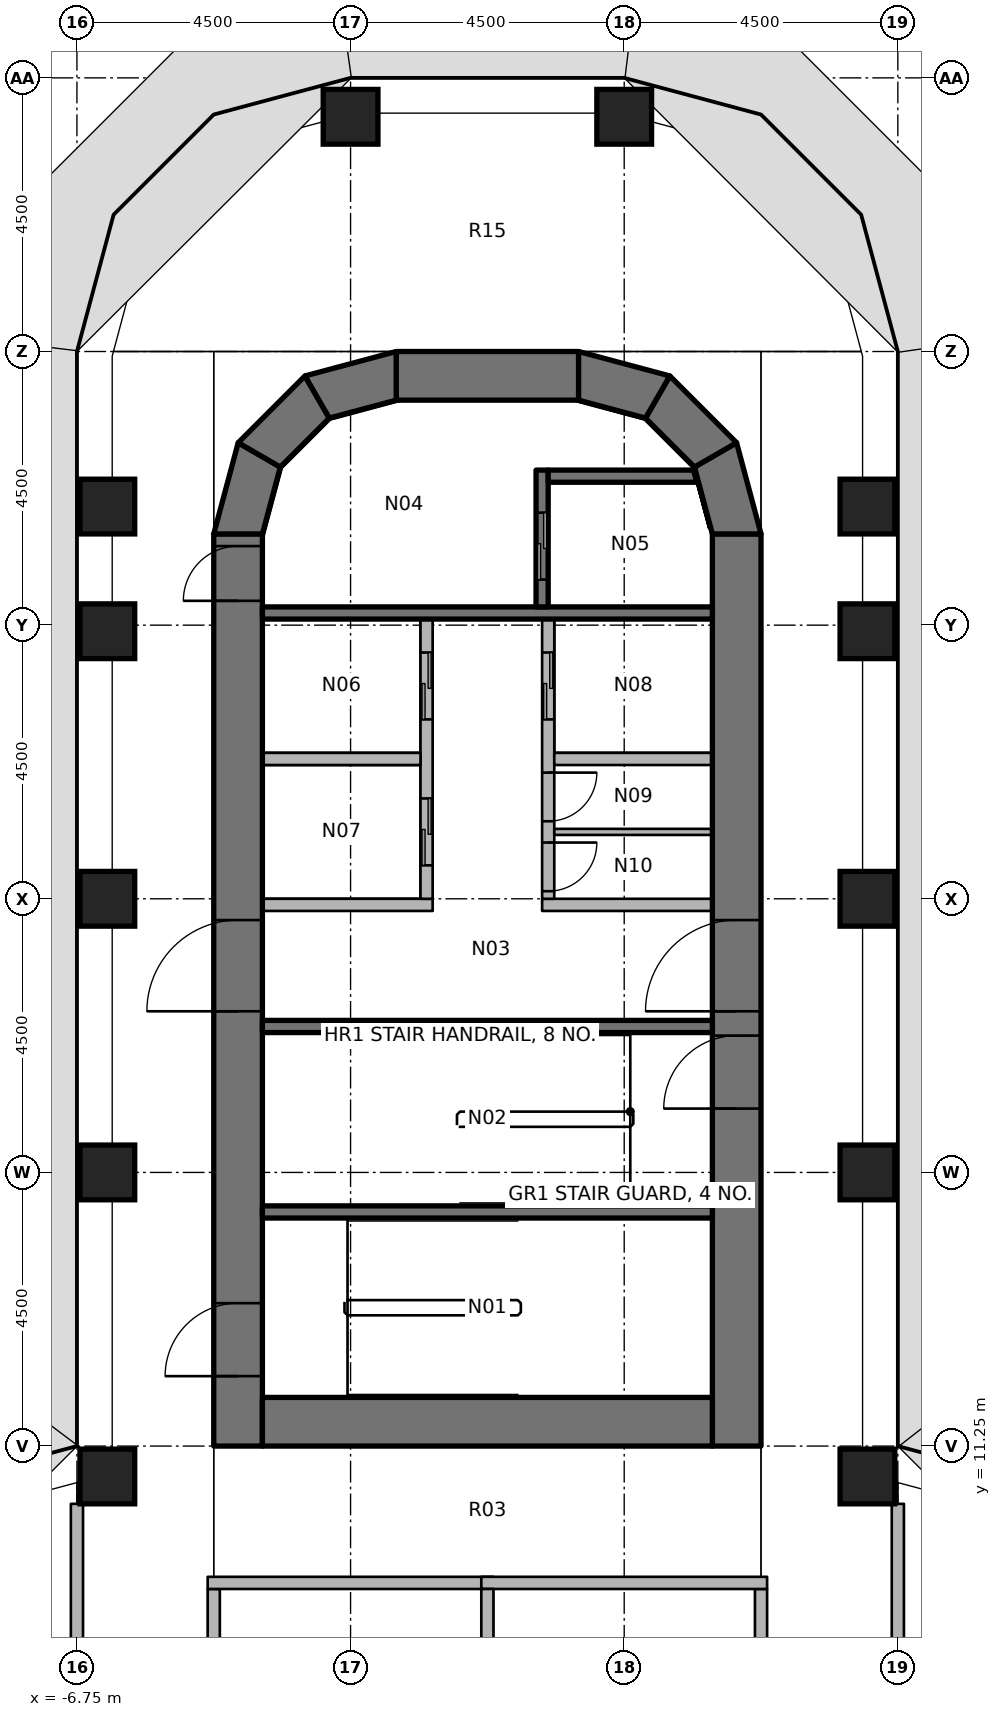
"""IFC4 building model, lengths in metres.
Left out: names, types, materials, properties, quantities, classifications, styles, units other than length and angle.
Written with IfcOpenShell. Run it as: python <this file> out.ifc"""

import sys

from ifc_helpers import new_model, si_unit, direction, frame, frame_2d, origin, origin_2d, place, context, subcontext, project, spatial, polyline, rectangle, outline, extrude, element, fill, save


model = new_model("IFC4")
c1 = context("Model", 3, precision=1e-05, world=origin(), true_north=direction((0.0, 1.0)))
c2 = subcontext(c1, "Body", "Model", "MODEL_VIEW")
j1 = project(units=[si_unit("LENGTHUNIT", "METRE"), si_unit("PLANEANGLEUNIT", "RADIAN")], contexts=[c1])
p1 = place(None, origin())
s1 = spatial("IfcSite", under=j1, at=p1, CompositionType="ELEMENT")
p2 = place(p1, origin())
s2 = spatial("IfcBuilding", under=s1, at=p2, CompositionType="ELEMENT")
p3 = place(p2, frame((0.0, 0.0, 86.6)))
s3 = spatial("IfcBuildingStorey", under=s2, at=p3, CompositionType="ELEMENT", Elevation=86.6)
for number, where, z_axis, x_axis in (
    (1, (-6.25, 10.75, 0.0), (0.0, 0.0, 1.0), (1.0, 0.0, 0.0)),
    (2, (-6.25, 15.75, 0.0), (0.0, 0.0, 1.0), (1.0, 0.0, 0.0)),
    (3, (-6.25, 20.25, 0.0), (0.0, 0.0, 1.0), (1.0, 0.0, 0.0)),
    (4, (-6.25, 24.65, 0.0), (0.0, 0.0, 1.0), (1.0, 0.0, 0.0)),
    (5, (-6.25, 26.7, 0.0), (0.0, 0.0, 1.0), (1.0, 0.0, 0.0)),
    (6, (-2.25, 33.11, 0.0), (0.0, 0.0, 1.0), (1.0, 0.0, 0.0)),
    (7, (2.25, 33.11, 0.0), (0.0, 0.0, 1.0), (1.0, 0.0, 0.0)),
    (8, (6.25, 10.75, 0.0), (0.0, 0.0, 1.0), (1.0, 0.0, 0.0)),
    (9, (6.25, 15.75, 0.0), (0.0, 0.0, 1.0), (1.0, 0.0, 0.0)),
    (10, (6.25, 20.25, 0.0), (0.0, 0.0, 1.0), (1.0, 0.0, 0.0)),
    (11, (6.25, 24.65, 0.0), (0.0, 0.0, 1.0), (1.0, 0.0, 0.0)),
    (12, (6.25, 26.7, 0.0), (0.0, 0.0, 1.0), (1.0, 0.0, 0.0)),
):
    element("IfcColumn", number, at=place(p3, frame(where, z_axis=z_axis, x_axis=x_axis)), inside=s3, PredefinedType="COLUMN", context=c2, shape_type="SweptSolid", body=[
        extrude(rectangle(XDim=0.9, YDim=0.9, at=origin_2d()), origin(), (0.0, 0.0, 1.0), 3.65),
    ])
p4 = place(p3, frame((-4.1, 11.25, 0.0), z_axis=(0.0, 0.0, 1.0), x_axis=(0.0, 1.0, 0.0)))
e13 = element("IfcWall", 13, at=p4, inside=s3, PredefinedType="SHEAR", context=c2, shape_type="SweptSolid", body=[
    extrude(rectangle(XDim=15.0, YDim=0.8, at=frame_2d((7.5, 0.0))), origin(), (0.0, 0.0, 1.0), 3.8),
])
p5 = place(p4, frame((7.15, 0.0, 0.0)))
e14 = element("IfcOpeningElement", 14, at=p5, cuts=e13, PredefinedType="OPENING", context=c2, shape_type="SweptSolid", body=[
    extrude(rectangle(XDim=1.5, YDim=2.3, at=frame_2d((0.75, 1.15))), frame((0.0, 0.41, 0.0), z_axis=(0.0, -1.0, 0.0), x_axis=(1.0, 0.0, 0.0)), (0.0, 0.0, 1.0), 0.82),
])
p6 = place(p4, frame((13.9, 0.0, 0.0)))
e15 = element("IfcOpeningElement", 15, at=p6, cuts=e13, PredefinedType="OPENING", context=c2, shape_type="SweptSolid", body=[
    extrude(rectangle(XDim=0.9, YDim=2.1, at=frame_2d((0.45, 1.05))), frame((0.0, 0.41, 0.0), z_axis=(0.0, -1.0, 0.0), x_axis=(1.0, 0.0, 0.0)), (0.0, 0.0, 1.0), 0.82),
])
p7 = place(p4, frame((1.15, 0.0, 0.0)))
e16 = element("IfcOpeningElement", 16, at=p7, cuts=e13, PredefinedType="OPENING", context=c2, shape_type="SweptSolid", body=[
    extrude(rectangle(XDim=1.2, YDim=2.1, at=frame_2d((0.6, 1.05))), frame((0.0, 0.41, 0.0), z_axis=(0.0, -1.0, 0.0), x_axis=(1.0, 0.0, 0.0)), (0.0, 0.0, 1.0), 0.82),
])
p8 = place(p3, frame((4.1, 11.25, 0.0), z_axis=(0.0, 0.0, 1.0), x_axis=(0.0, 1.0, 0.0)))
e17 = element("IfcWall", 17, at=p8, inside=s3, PredefinedType="SHEAR", context=c2, shape_type="SweptSolid", body=[
    extrude(rectangle(XDim=15.0, YDim=0.8, at=frame_2d((7.5, 0.0))), origin(), (0.0, 0.0, 1.0), 3.8),
])
p9 = place(p8, frame((7.15, 0.0, 0.0)))
e18 = element("IfcOpeningElement", 18, at=p9, cuts=e17, PredefinedType="OPENING", context=c2, shape_type="SweptSolid", body=[
    extrude(rectangle(XDim=1.5, YDim=2.3, at=frame_2d((0.75, 1.15))), frame((0.0, 0.41, 0.0), z_axis=(0.0, -1.0, 0.0), x_axis=(1.0, 0.0, 0.0)), (0.0, 0.0, 1.0), 0.82),
])
p10 = place(p8, frame((5.55, 0.0, 0.0)))
e19 = element("IfcOpeningElement", 19, at=p10, cuts=e17, PredefinedType="OPENING", context=c2, shape_type="SweptSolid", body=[
    extrude(rectangle(XDim=1.2, YDim=2.1, at=frame_2d((0.6, 1.05))), frame((0.0, 0.41, 0.0), z_axis=(0.0, -1.0, 0.0), x_axis=(1.0, 0.0, 0.0)), (0.0, 0.0, 1.0), 0.82),
])
p11 = place(p3, frame((-3.7, 11.65, 0.0), z_axis=(0.0, 0.0, 1.0), x_axis=(1.0, 0.0, 0.0)))
e20 = element("IfcWall", 20, at=p11, inside=s3, PredefinedType="SHEAR", context=c2, shape_type="SweptSolid", body=[
    extrude(rectangle(XDim=7.4, YDim=0.8, at=frame_2d((3.7, 0.0))), origin(), (0.0, 0.0, 1.0), 3.8),
])
p12 = place(p3, frame((-1.5, 28.85, 0.0), z_axis=(0.0, 0.0, 1.0), x_axis=(1.0, 0.0, 0.0)))
e21 = element("IfcWall", 21, at=p12, inside=s3, PredefinedType="SHEAR", context=c2, shape_type="SweptSolid", body=[
    extrude(rectangle(XDim=3.0, YDim=0.8, at=frame_2d((1.5, 0.0))), origin(), (0.0, 0.0, 1.0), 3.8),
])
p13 = place(p3, origin())
e22 = element("IfcWall", 22, at=p13, inside=s3, PredefinedType="SHEAR", context=c2, shape_type="SweptSolid", body=[
    extrude(outline(polyline([(-4.5, 26.25), (-4.098, 27.75), (-3.405, 27.35), (-3.7, 26.25), (-4.5, 26.25)])), origin(), (0.0, 0.0, 1.0), 3.8),
])
p14 = place(p3, origin())
e23 = element("IfcWall", 23, at=p14, inside=s3, PredefinedType="SHEAR", context=c2, shape_type="SweptSolid", body=[
    extrude(outline(polyline([(-4.098, 27.75), (-3.0, 28.848), (-2.6, 28.155), (-3.405, 27.35), (-4.098, 27.75)])), origin(), (0.0, 0.0, 1.0), 3.8),
])
p15 = place(p3, origin())
e24 = element("IfcWall", 24, at=p15, inside=s3, PredefinedType="SHEAR", context=c2, shape_type="SweptSolid", body=[
    extrude(outline(polyline([(-3.0, 28.848), (-1.5, 29.25), (-1.5, 28.45), (-2.6, 28.155), (-3.0, 28.848)])), origin(), (0.0, 0.0, 1.0), 3.8),
])
p16 = place(p3, origin())
e25 = element("IfcWall", 25, at=p16, inside=s3, PredefinedType="SHEAR", context=c2, shape_type="SweptSolid", body=[
    extrude(outline(polyline([(4.5, 26.25), (4.098, 27.75), (3.405, 27.35), (3.7, 26.25), (4.5, 26.25)])), origin(), (0.0, 0.0, 1.0), 3.8),
])
p17 = place(p3, origin())
e26 = element("IfcWall", 26, at=p17, inside=s3, PredefinedType="SHEAR", context=c2, shape_type="SweptSolid", body=[
    extrude(outline(polyline([(4.098, 27.75), (3.0, 28.848), (2.6, 28.155), (3.405, 27.35), (4.098, 27.75)])), origin(), (0.0, 0.0, 1.0), 3.8),
])
p18 = place(p3, origin())
e27 = element("IfcWall", 27, at=p18, inside=s3, PredefinedType="SHEAR", context=c2, shape_type="SweptSolid", body=[
    extrude(outline(polyline([(3.0, 28.848), (1.5, 29.25), (1.5, 28.45), (2.6, 28.155), (3.0, 28.848)])), origin(), (0.0, 0.0, 1.0), 3.8),
])
p19 = place(p3, frame((-3.7, 24.95, 0.0), z_axis=(0.0, 0.0, 1.0), x_axis=(1.0, 0.0, 0.0)))
e28 = element("IfcWall", 28, at=p19, inside=s3, PredefinedType="SHEAR", context=c2, shape_type="SweptSolid", body=[
    extrude(rectangle(XDim=7.4, YDim=0.2, at=frame_2d((3.7, 0.0))), origin(), (0.0, 0.0, 1.0), 3.65),
])
p20 = place(p3, frame((0.9, 27.3, 0.0), z_axis=(0.0, 0.0, 1.0), x_axis=(0.0, -1.0, 0.0)))
e29 = element("IfcWall", 29, at=p20, inside=s3, PredefinedType="SHEAR", context=c2, shape_type="SweptSolid", body=[
    extrude(rectangle(XDim=2.25, YDim=0.2, at=frame_2d((1.125, 0.0))), origin(), (0.0, 0.0, 1.0), 3.65),
])
p21 = place(p20, frame((0.7, 0.0, 0.0)))
e30 = element("IfcOpeningElement", 30, at=p21, cuts=e29, PredefinedType="OPENING", context=c2, shape_type="SweptSolid", body=[
    extrude(rectangle(XDim=1.1, YDim=2.3, at=frame_2d((0.55, 1.15))), frame((0.0, 0.11, 0.0), z_axis=(0.0, -1.0, 0.0), x_axis=(1.0, 0.0, 0.0)), (0.0, 0.0, 1.0), 0.22),
])
p22 = place(p3, origin())
e31 = element("IfcWall", 31, at=p22, inside=s3, PredefinedType="SHEAR", context=c2, shape_type="SweptSolid", body=[
    extrude(outline(polyline([(1.0, 27.1), (3.444, 27.1), (3.39, 27.3), (1.0, 27.3), (1.0, 27.1)])), origin(), (0.0, 0.0, 1.0), 3.65),
])
for number, where, z_axis, x_axis in (
    (32, (-3.7, 18.15, 0.0), (0.0, 0.0, 1.0), (1.0, 0.0, 0.0)),
    (33, (-3.7, 15.1, 0.0), (0.0, 0.0, 1.0), (1.0, 0.0, 0.0)),
):
    element("IfcWall", number, at=place(p3, frame(where, z_axis=z_axis, x_axis=x_axis)), inside=s3, PredefinedType="SHEAR", context=c2, shape_type="SweptSolid", body=[
        extrude(rectangle(XDim=7.4, YDim=0.2, at=frame_2d((3.7, 0.0))), origin(), (0.0, 0.0, 1.0), 3.65),
    ])
p23 = place(p3, frame((-3.7, 20.15, 0.0), z_axis=(0.0, 0.0, 1.0), x_axis=(1.0, 0.0, 0.0)))
e34 = element("IfcWall", 34, at=p23, inside=s3, PredefinedType="PARTITIONING", context=c2, shape_type="SweptSolid", body=[
    extrude(rectangle(XDim=2.8, YDim=0.2, at=frame_2d((1.4, 0.0))), origin(), (0.0, 0.0, 1.0), 3.65),
])
p24 = place(p3, frame((-1.0, 24.85, 0.0), z_axis=(0.0, 0.0, 1.0), x_axis=(0.0, -1.0, 0.0)))
e35 = element("IfcWall", 35, at=p24, inside=s3, PredefinedType="PARTITIONING", context=c2, shape_type="SweptSolid", body=[
    extrude(rectangle(XDim=4.6, YDim=0.2, at=frame_2d((2.3, 0.0))), origin(), (0.0, 0.0, 1.0), 3.65),
])
p25 = place(p24, frame((0.55, 0.0, 0.0)))
e36 = element("IfcOpeningElement", 36, at=p25, cuts=e35, PredefinedType="OPENING", context=c2, shape_type="SweptSolid", body=[
    extrude(rectangle(XDim=1.1, YDim=2.3, at=frame_2d((0.55, 1.15))), frame((0.0, 0.11, 0.0), z_axis=(0.0, -1.0, 0.0), x_axis=(1.0, 0.0, 0.0)), (0.0, 0.0, 1.0), 0.22),
])
p26 = place(p24, frame((2.95, 0.0, 0.0)))
e37 = element("IfcOpeningElement", 37, at=p26, cuts=e35, PredefinedType="OPENING", context=c2, shape_type="SweptSolid", body=[
    extrude(rectangle(XDim=1.1, YDim=2.3, at=frame_2d((0.55, 1.15))), frame((0.0, 0.11, 0.0), z_axis=(0.0, -1.0, 0.0), x_axis=(1.0, 0.0, 0.0)), (0.0, 0.0, 1.0), 0.22),
])
p27 = place(p3, frame((0.9, 20.15, 0.0), z_axis=(0.0, 0.0, 1.0), x_axis=(1.0, 0.0, 0.0)))
e38 = element("IfcWall", 38, at=p27, inside=s3, PredefinedType="PARTITIONING", context=c2, shape_type="SweptSolid", body=[
    extrude(rectangle(XDim=2.8, YDim=0.2, at=frame_2d((1.4, 0.0))), origin(), (0.0, 0.0, 1.0), 3.65),
])
p28 = place(p3, frame((1.0, 24.85, 0.0), z_axis=(0.0, 0.0, 1.0), x_axis=(0.0, -1.0, 0.0)))
e39 = element("IfcWall", 39, at=p28, inside=s3, PredefinedType="PARTITIONING", context=c2, shape_type="SweptSolid", body=[
    extrude(rectangle(XDim=4.6, YDim=0.2, at=frame_2d((2.3, 0.0))), origin(), (0.0, 0.0, 1.0), 3.65),
])
p29 = place(p28, frame((0.55, 0.0, 0.0)))
e40 = element("IfcOpeningElement", 40, at=p29, cuts=e39, PredefinedType="OPENING", context=c2, shape_type="SweptSolid", body=[
    extrude(rectangle(XDim=1.1, YDim=2.3, at=frame_2d((0.55, 1.15))), frame((0.0, 0.11, 0.0), z_axis=(0.0, -1.0, 0.0), x_axis=(1.0, 0.0, 0.0)), (0.0, 0.0, 1.0), 0.22),
])
p30 = place(p28, frame((2.525, 0.0, 0.0)))
e41 = element("IfcOpeningElement", 41, at=p30, cuts=e39, PredefinedType="OPENING", context=c2, shape_type="SweptSolid", body=[
    extrude(rectangle(XDim=0.8, YDim=2.1, at=frame_2d((0.4, 1.05))), frame((0.0, 0.11, 0.0), z_axis=(0.0, -1.0, 0.0), x_axis=(1.0, 0.0, 0.0)), (0.0, 0.0, 1.0), 0.22),
])
p31 = place(p28, frame((3.675, 0.0, 0.0)))
e42 = element("IfcOpeningElement", 42, at=p31, cuts=e39, PredefinedType="OPENING", context=c2, shape_type="SweptSolid", body=[
    extrude(rectangle(XDim=0.8, YDim=2.1, at=frame_2d((0.4, 1.05))), frame((0.0, 0.11, 0.0), z_axis=(0.0, -1.0, 0.0), x_axis=(1.0, 0.0, 0.0)), (0.0, 0.0, 1.0), 0.22),
])
for number, where, z_axis, x_axis in (
    (43, (-3.7, 22.55, 0.0), (0.0, 0.0, 1.0), (1.0, 0.0, 0.0)),
    (44, (1.1, 22.55, 0.0), (0.0, 0.0, 1.0), (1.0, 0.0, 0.0)),
):
    element("IfcWall", number, at=place(p3, frame(where, z_axis=z_axis, x_axis=x_axis)), inside=s3, PredefinedType="PARTITIONING", context=c2, shape_type="SweptSolid", body=[
        extrude(rectangle(XDim=2.6, YDim=0.2, at=frame_2d((1.3, 0.0))), origin(), (0.0, 0.0, 1.0), 3.65),
    ])
p32 = place(p3, frame((1.1, 21.35, 0.0), z_axis=(0.0, 0.0, 1.0), x_axis=(1.0, 0.0, 0.0)))
e45 = element("IfcWall", 45, at=p32, inside=s3, PredefinedType="PARTITIONING", context=c2, shape_type="SweptSolid", body=[
    extrude(rectangle(XDim=2.6, YDim=0.1, at=frame_2d((1.3, 0.0))), origin(), (0.0, 0.0, 1.0), 3.65),
])
p33 = place(p3, frame((-4.5, 8.9, 0.0), z_axis=(0.0, 0.0, 1.0), x_axis=(0.0, -1.0, 0.0)))
e46 = element("IfcWall", 46, at=p33, inside=s3, PredefinedType="PARTITIONING", context=c2, shape_type="SweptSolid", body=[
    extrude(rectangle(XDim=17.8, YDim=0.2, at=frame_2d((8.9, 0.0))), origin(), (0.0, 0.0, 1.0), 2.738),
])
p34 = place(p33, frame((8.4, 0.0, 0.0)))
e47 = element("IfcOpeningElement", 47, at=p34, cuts=e46, PredefinedType="OPENING", context=c2, shape_type="SweptSolid", body=[
    extrude(rectangle(XDim=1.0, YDim=2.1, at=frame_2d((0.5, 1.05))), frame((0.0, 0.11, 0.0), z_axis=(0.0, -1.0, 0.0), x_axis=(1.0, 0.0, 0.0)), (0.0, 0.0, 1.0), 0.22),
])
p35 = place(p3, frame((-6.75, 6.7, 0.0), z_axis=(0.0, 0.0, 1.0), x_axis=(0.0, 1.0, 0.0)))
e48 = element("IfcWall", 48, at=p35, inside=s3, PredefinedType="PARTITIONING", context=c2, shape_type="SweptSolid", body=[
    extrude(rectangle(XDim=3.6, YDim=0.2, at=frame_2d((1.8, 0.0))), origin(), (0.0, 0.0, 1.0), 2.738),
])
p36 = place(p3, frame((4.5, -8.9, 0.0), z_axis=(0.0, 0.0, 1.0), x_axis=(0.0, 1.0, 0.0)))
e49 = element("IfcWall", 49, at=p36, inside=s3, PredefinedType="PARTITIONING", context=c2, shape_type="SweptSolid", body=[
    extrude(rectangle(XDim=17.8, YDim=0.2, at=frame_2d((8.9, 0.0))), origin(), (0.0, 0.0, 1.0), 2.738),
])
p37 = place(p36, frame((8.4, 0.0, 0.0)))
e50 = element("IfcOpeningElement", 50, at=p37, cuts=e49, PredefinedType="OPENING", context=c2, shape_type="SweptSolid", body=[
    extrude(rectangle(XDim=1.0, YDim=2.1, at=frame_2d((0.5, 1.05))), frame((0.0, 0.11, 0.0), z_axis=(0.0, -1.0, 0.0), x_axis=(1.0, 0.0, 0.0)), (0.0, 0.0, 1.0), 0.22),
])
p38 = place(p3, frame((6.75, 6.7, 0.0), z_axis=(0.0, 0.0, 1.0), x_axis=(0.0, 1.0, 0.0)))
e51 = element("IfcWall", 51, at=p38, inside=s3, PredefinedType="PARTITIONING", context=c2, shape_type="SweptSolid", body=[
    extrude(rectangle(XDim=3.6, YDim=0.2, at=frame_2d((1.8, 0.0))), origin(), (0.0, 0.0, 1.0), 2.738),
])
for number, where, z_axis, x_axis in (
    (52, (-4.6, 9.0, 0.0), (0.0, 0.0, 1.0), (1.0, 0.0, 0.0)),
    (53, (-0.1, 9.0, 0.0), (0.0, 0.0, 1.0), (1.0, 0.0, 0.0)),
):
    element("IfcWall", number, at=place(p3, frame(where, z_axis=z_axis, x_axis=x_axis)), inside=s3, PredefinedType="PARTITIONING", context=c2, shape_type="SweptSolid", body=[
        extrude(rectangle(XDim=4.7, YDim=0.2, at=frame_2d((2.35, 0.0))), origin(), (0.0, 0.0, 1.0), 2.738),
    ])
p39 = place(p3, frame((0.0, -8.9, 0.0), z_axis=(0.0, 0.0, 1.0), x_axis=(0.0, 1.0, 0.0)))
e54 = element("IfcWall", 54, at=p39, inside=s3, PredefinedType="PARTITIONING", context=c2, shape_type="SweptSolid", body=[
    extrude(rectangle(XDim=17.8, YDim=0.2, at=frame_2d((8.9, 0.0))), origin(), (0.0, 0.0, 1.0), 2.738),
])
p40 = place(p5, origin())
e55 = element("IfcDoor", 55, at=p40, inside=s3, OperationType="DOUBLE_DOOR_SINGLE_SWING", PredefinedType="DOOR", context=c2, shape_type="SweptSolid", body=[
    extrude(rectangle(XDim=1.5, YDim=2.3, at=frame_2d((0.75, 1.15))), frame((0.0, 0.025, 0.0), z_axis=(0.0, -1.0, 0.0), x_axis=(1.0, 0.0, 0.0)), (0.0, 0.0, 1.0), 0.05),
])
fill(e14, e55)
p41 = place(p9, origin())
e56 = element("IfcDoor", 56, at=p41, inside=s3, OperationType="DOUBLE_DOOR_SINGLE_SWING", PredefinedType="DOOR", context=c2, shape_type="SweptSolid", body=[
    extrude(rectangle(XDim=1.5, YDim=2.3, at=frame_2d((0.75, 1.15))), frame((0.0, 0.025, 0.0), z_axis=(0.0, -1.0, 0.0), x_axis=(1.0, 0.0, 0.0)), (0.0, 0.0, 1.0), 0.05),
])
fill(e18, e56)
p42 = place(p6, origin())
e57 = element("IfcDoor", 57, at=p42, inside=s3, OperationType="SINGLE_SWING_RIGHT", PredefinedType="DOOR", context=c2, shape_type="SweptSolid", body=[
    extrude(rectangle(XDim=0.9, YDim=2.1, at=frame_2d((0.45, 1.05))), frame((0.0, 0.025, 0.0), z_axis=(0.0, -1.0, 0.0), x_axis=(1.0, 0.0, 0.0)), (0.0, 0.0, 1.0), 0.05),
])
fill(e15, e57)
p43 = place(p10, origin())
e58 = element("IfcDoor", 58, at=p43, inside=s3, OperationType="SINGLE_SWING_LEFT", PredefinedType="DOOR", context=c2, shape_type="SweptSolid", body=[
    extrude(rectangle(XDim=1.2, YDim=2.1, at=frame_2d((0.6, 1.05))), frame((0.0, 0.025, 0.0), z_axis=(0.0, -1.0, 0.0), x_axis=(1.0, 0.0, 0.0)), (0.0, 0.0, 1.0), 0.05),
])
fill(e19, e58)
p44 = place(p7, origin())
e59 = element("IfcDoor", 59, at=p44, inside=s3, OperationType="SINGLE_SWING_RIGHT", PredefinedType="DOOR", context=c2, shape_type="SweptSolid", body=[
    extrude(rectangle(XDim=1.2, YDim=2.1, at=frame_2d((0.6, 1.05))), frame((0.0, 0.025, 0.0), z_axis=(0.0, -1.0, 0.0), x_axis=(1.0, 0.0, 0.0)), (0.0, 0.0, 1.0), 0.05),
])
fill(e16, e59)
p45 = place(p21, origin())
e60 = element("IfcDoor", 60, at=p45, inside=s3, OperationType="DOUBLE_DOOR_SLIDING", PredefinedType="DOOR", context=c2, shape_type="SweptSolid", body=[
    extrude(rectangle(XDim=1.1, YDim=2.3, at=frame_2d((0.55, 1.15))), frame((0.0, 0.025, 0.0), z_axis=(0.0, -1.0, 0.0), x_axis=(1.0, 0.0, 0.0)), (0.0, 0.0, 1.0), 0.05),
])
fill(e30, e60)
p46 = place(p25, origin())
e61 = element("IfcDoor", 61, at=p46, inside=s3, OperationType="DOUBLE_DOOR_SLIDING", PredefinedType="DOOR", context=c2, shape_type="SweptSolid", body=[
    extrude(rectangle(XDim=1.1, YDim=2.3, at=frame_2d((0.55, 1.15))), frame((0.0, 0.025, 0.0), z_axis=(0.0, -1.0, 0.0), x_axis=(1.0, 0.0, 0.0)), (0.0, 0.0, 1.0), 0.05),
])
fill(e36, e61)
p47 = place(p26, origin())
e62 = element("IfcDoor", 62, at=p47, inside=s3, OperationType="DOUBLE_DOOR_SLIDING", PredefinedType="DOOR", context=c2, shape_type="SweptSolid", body=[
    extrude(rectangle(XDim=1.1, YDim=2.3, at=frame_2d((0.55, 1.15))), frame((0.0, 0.025, 0.0), z_axis=(0.0, -1.0, 0.0), x_axis=(1.0, 0.0, 0.0)), (0.0, 0.0, 1.0), 0.05),
])
fill(e37, e62)
p48 = place(p29, origin())
e63 = element("IfcDoor", 63, at=p48, inside=s3, OperationType="DOUBLE_DOOR_SLIDING", PredefinedType="DOOR", context=c2, shape_type="SweptSolid", body=[
    extrude(rectangle(XDim=1.1, YDim=2.3, at=frame_2d((0.55, 1.15))), frame((0.0, 0.025, 0.0), z_axis=(0.0, -1.0, 0.0), x_axis=(1.0, 0.0, 0.0)), (0.0, 0.0, 1.0), 0.05),
])
fill(e40, e63)
p49 = place(p30, origin())
e64 = element("IfcDoor", 64, at=p49, inside=s3, OperationType="SINGLE_SWING_RIGHT", PredefinedType="DOOR", context=c2, shape_type="SweptSolid", body=[
    extrude(rectangle(XDim=0.8, YDim=2.1, at=frame_2d((0.4, 1.05))), frame((0.0, 0.025, 0.0), z_axis=(0.0, -1.0, 0.0), x_axis=(1.0, 0.0, 0.0)), (0.0, 0.0, 1.0), 0.05),
])
fill(e41, e64)
p50 = place(p31, origin())
e65 = element("IfcDoor", 65, at=p50, inside=s3, OperationType="SINGLE_SWING_LEFT", PredefinedType="DOOR", context=c2, shape_type="SweptSolid", body=[
    extrude(rectangle(XDim=0.8, YDim=2.1, at=frame_2d((0.4, 1.05))), frame((0.0, 0.025, 0.0), z_axis=(0.0, -1.0, 0.0), x_axis=(1.0, 0.0, 0.0)), (0.0, 0.0, 1.0), 0.05),
])
fill(e42, e65)
save(model, sys.argv[1])
